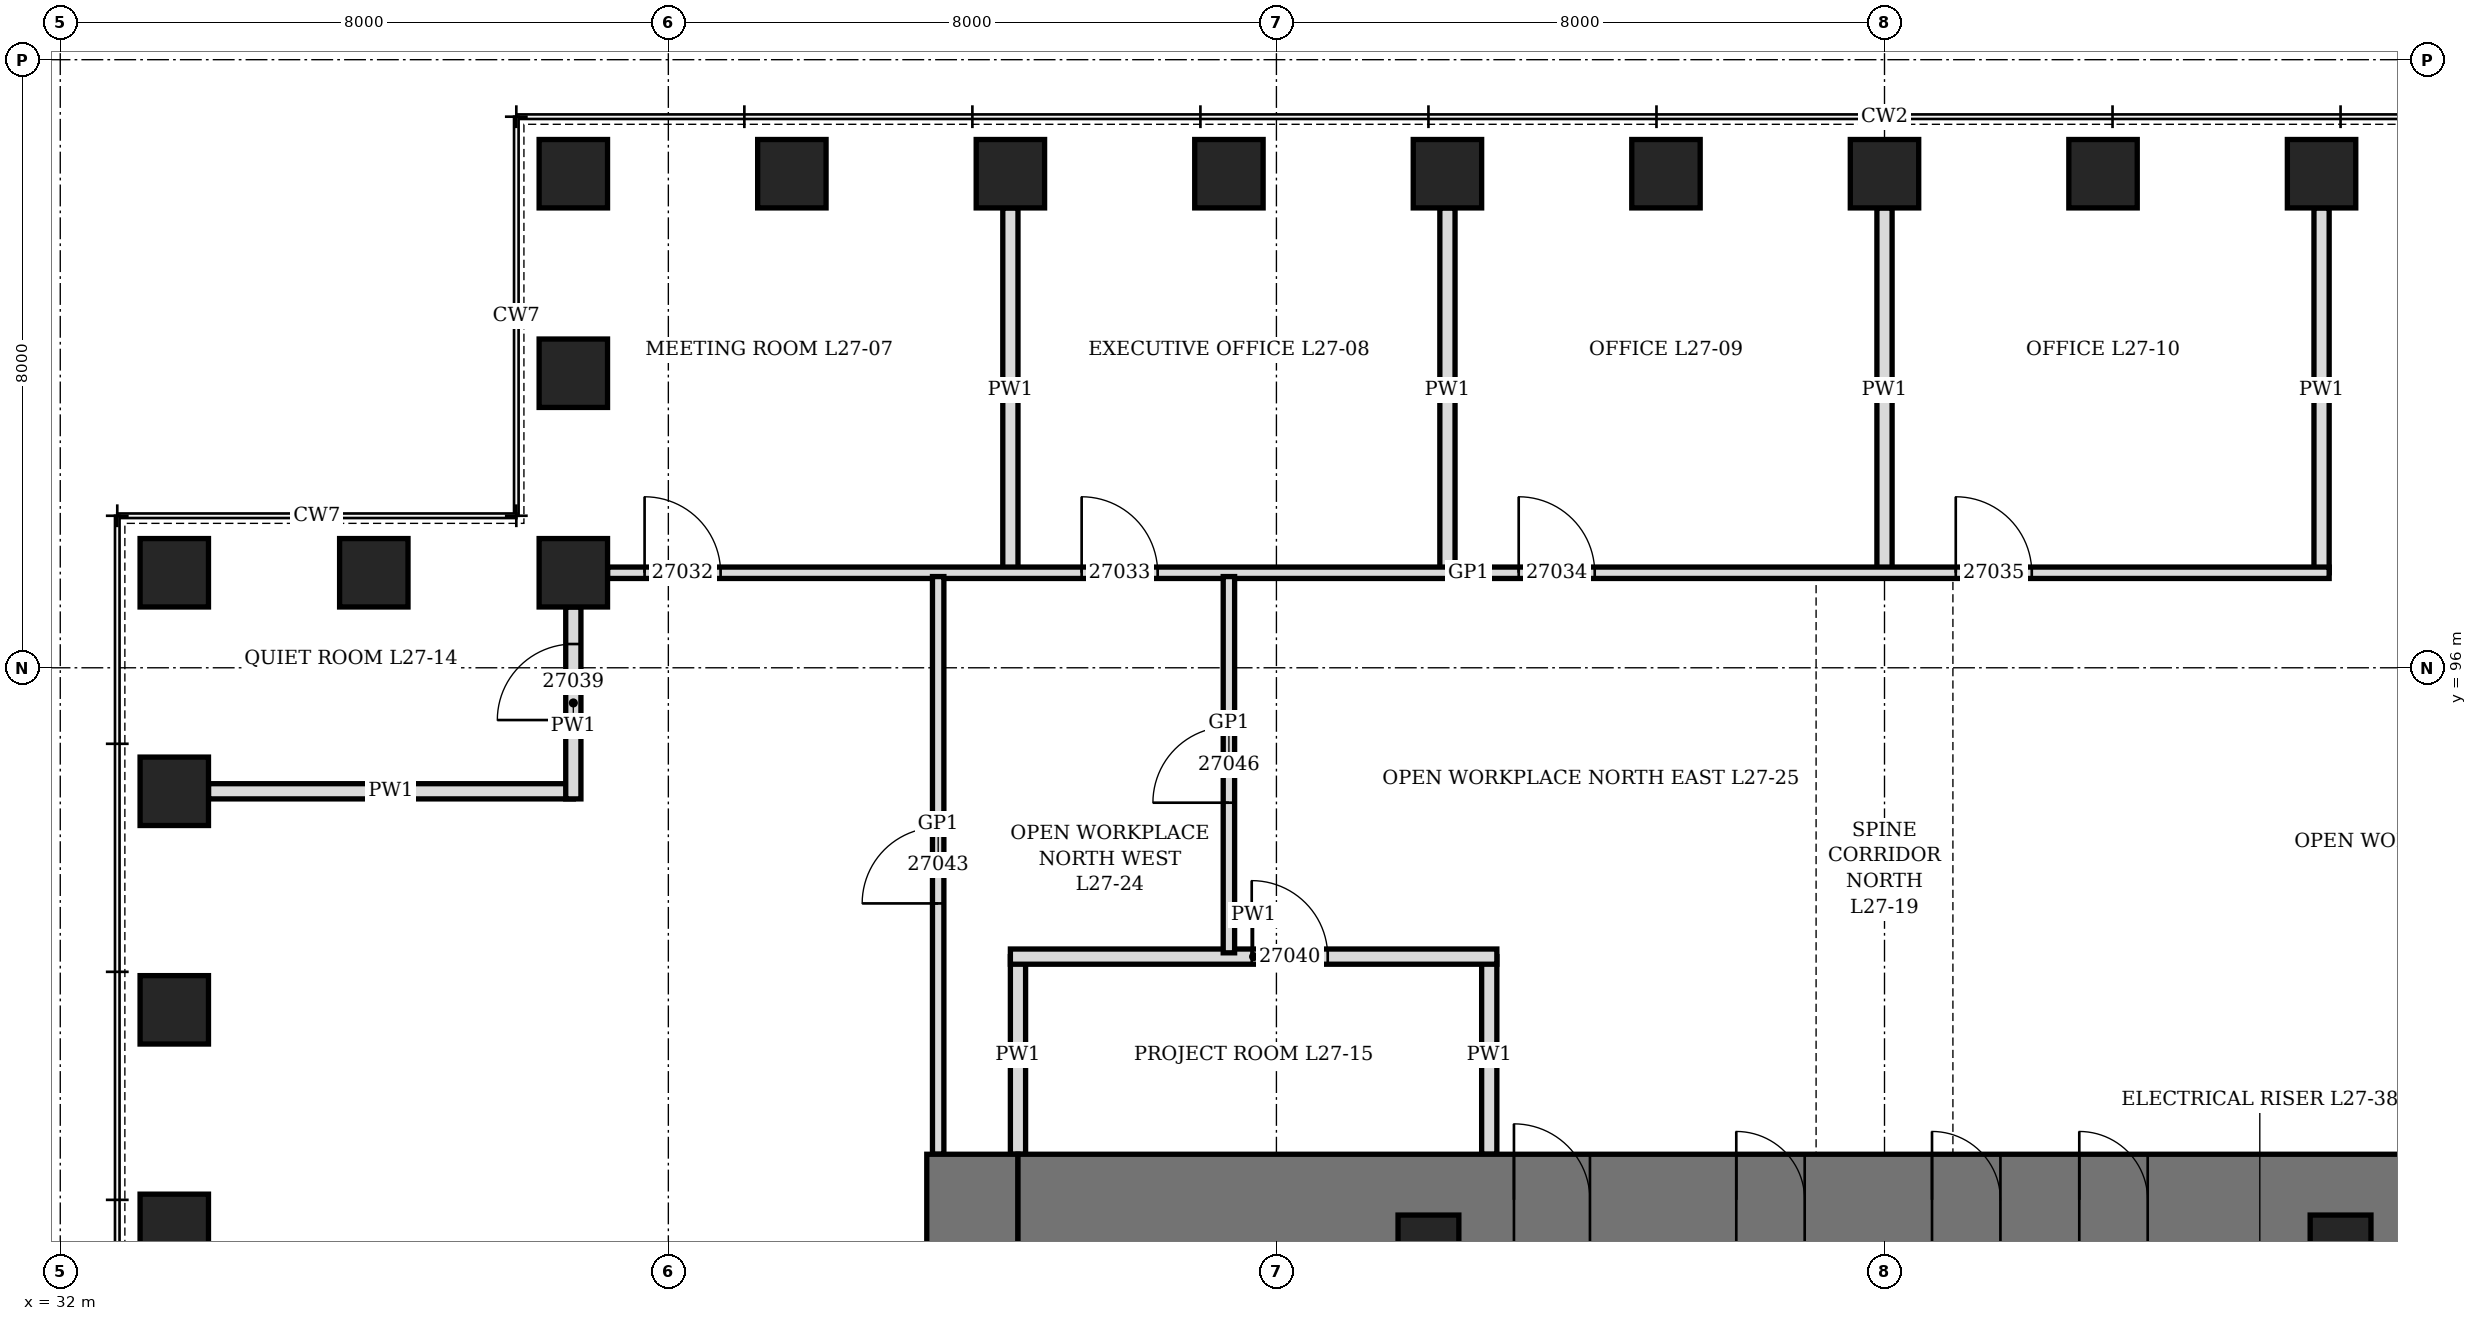
"""IFC4 building model, lengths in metres.
Left out: names, types, materials, properties, quantities, classifications, styles, units other than length and angle.
Written with IfcOpenShell. Run it as: python <this file> out.ifc"""

import sys

from ifc_helpers import new_model, si_unit, direction, frame, frame_2d, origin, origin_2d, place, context, subcontext, project, spatial, rectangle, hollow_rectangle, extrude, element, fill, save


model = new_model("IFC4")
c1 = context("Model", 3, precision=1e-05, world=origin(), true_north=direction((0.0, 1.0)))
c2 = subcontext(c1, "Body", "Model", "MODEL_VIEW")
j1 = project(units=[si_unit("LENGTHUNIT", "METRE"), si_unit("PLANEANGLEUNIT", "RADIAN")], contexts=[c1])
p1 = place(None, origin())
s1 = spatial("IfcSite", under=j1, at=p1, CompositionType="ELEMENT")
p2 = place(p1, origin())
s2 = spatial("IfcBuilding", under=s1, at=p2, CompositionType="ELEMENT")
p3 = place(p2, frame((0.0, 0.0, 124.9)))
s3 = spatial("IfcBuildingStorey", under=s2, at=p3, CompositionType="ELEMENT", Elevation=124.9)
for number, where, z_axis, x_axis in (
    (1, (61.75, 102.5, 0.0), (0.0, 0.0, 1.0), (1.0, 0.0, 0.0)),
    (2, (58.875, 102.5, 0.0), (0.0, 0.0, 1.0), (1.0, 0.0, 0.0)),
    (3, (56.0, 102.5, 0.0), (0.0, 0.0, 1.0), (1.0, 0.0, 0.0)),
    (4, (53.125, 102.5, 0.0), (0.0, 0.0, 1.0), (1.0, 0.0, 0.0)),
    (5, (50.25, 102.5, 0.0), (0.0, 0.0, 1.0), (1.0, 0.0, 0.0)),
    (6, (47.375, 102.5, 0.0), (0.0, 0.0, 1.0), (1.0, 0.0, 0.0)),
    (7, (44.5, 102.5, 0.0), (0.0, 0.0, 1.0), (1.0, 0.0, 0.0)),
    (8, (41.625, 102.5, 0.0), (0.0, 0.0, 1.0), (1.0, 0.0, 0.0)),
    (9, (38.75, 102.5, 0.0), (0.0, 0.0, 1.0), (0.0, 1.0, 0.0)),
    (10, (38.75, 99.875, 0.0), (0.0, 0.0, 1.0), (0.0, 1.0, 0.0)),
    (11, (38.75, 97.25, 0.0), (0.0, 0.0, 1.0), (1.0, 0.0, 0.0)),
    (12, (36.125, 97.25, 0.0), (0.0, 0.0, 1.0), (1.0, 0.0, 0.0)),
    (13, (33.5, 97.25, 0.0), (0.0, 0.0, 1.0), (0.0, 1.0, 0.0)),
    (14, (33.5, 94.375, 0.0), (0.0, 0.0, 1.0), (0.0, 1.0, 0.0)),
    (15, (33.5, 91.5, 0.0), (0.0, 0.0, 1.0), (0.0, 1.0, 0.0)),
    (16, (33.5, 88.625, 0.0), (0.0, 0.0, 1.0), (0.0, 1.0, 0.0)),
):
    element("IfcColumn", number, at=place(p3, frame(where, z_axis=z_axis, x_axis=x_axis)), inside=s3, PredefinedType="COLUMN", context=c2, shape_type="SweptSolid", body=[
        extrude(hollow_rectangle(XDim=0.9, YDim=0.9, WallThickness=0.15, at=origin_2d()), origin(), (0.0, 0.0, 1.0), 4.2),
    ])
p4 = place(p3, frame((44.0, 70.4, 0.0), z_axis=(0.0, 0.0, 1.0), x_axis=(0.0, 1.0, 0.0)))
e17 = element("IfcWall", 17, at=p4, inside=s3, PredefinedType="SHEAR", context=c2, shape_type="SweptSolid", body=[
    extrude(rectangle(XDim=19.2, YDim=1.2, at=frame_2d((9.6, 0.0))), origin(), (0.0, 0.0, 1.0), 4.2),
])
p5 = place(p4, frame((8.6, 0.0, 0.0)))
e18 = element("IfcOpeningElement", 18, at=p5, cuts=e17, PredefinedType="OPENING", context=c2, shape_type="SweptSolid", body=[
    extrude(rectangle(XDim=2.0, YDim=2.4, at=frame_2d((1.0, 1.2))), frame((0.0, 0.61, 0.0), z_axis=(0.0, -1.0, 0.0), x_axis=(1.0, 0.0, 0.0)), (0.0, 0.0, 1.0), 1.22),
])
p6 = place(p3, frame((44.6, 89.0, 0.0), z_axis=(0.0, 0.0, 1.0), x_axis=(1.0, 0.0, 0.0)))
e19 = element("IfcWall", 19, at=p6, inside=s3, PredefinedType="SHEAR", context=c2, shape_type="SweptSolid", body=[
    extrude(rectangle(XDim=22.8, YDim=1.2, at=frame_2d((11.4, 0.0))), origin(), (0.0, 0.0, 1.0), 4.2),
])
p7 = place(p6, frame((6.525, 0.0, 0.0)))
e20 = element("IfcOpeningElement", 20, at=p7, cuts=e19, PredefinedType="OPENING", context=c2, shape_type="SweptSolid", body=[
    extrude(rectangle(XDim=1.0, YDim=2.1, at=frame_2d((0.5, 1.05))), frame((0.0, 0.61, 0.0), z_axis=(0.0, -1.0, 0.0), x_axis=(1.0, 0.0, 0.0)), (0.0, 0.0, 1.0), 1.22),
])
p8 = place(p6, frame((9.45, 0.0, 0.0)))
e21 = element("IfcOpeningElement", 21, at=p8, cuts=e19, PredefinedType="OPENING", context=c2, shape_type="SweptSolid", body=[
    extrude(rectangle(XDim=0.9, YDim=2.1, at=frame_2d((0.45, 1.05))), frame((0.0, 0.61, 0.0), z_axis=(0.0, -1.0, 0.0), x_axis=(1.0, 0.0, 0.0)), (0.0, 0.0, 1.0), 1.22),
])
p9 = place(p6, frame((12.025, 0.0, 0.0)))
e22 = element("IfcOpeningElement", 22, at=p9, cuts=e19, PredefinedType="OPENING", context=c2, shape_type="SweptSolid", body=[
    extrude(rectangle(XDim=0.9, YDim=2.1, at=frame_2d((0.45, 1.05))), frame((0.0, 0.61, 0.0), z_axis=(0.0, -1.0, 0.0), x_axis=(1.0, 0.0, 0.0)), (0.0, 0.0, 1.0), 1.22),
])
p10 = place(p6, frame((13.962, 0.0, 0.0)))
e23 = element("IfcOpeningElement", 23, at=p10, cuts=e19, PredefinedType="OPENING", context=c2, shape_type="SweptSolid", body=[
    extrude(rectangle(XDim=0.9, YDim=2.1, at=frame_2d((0.45, 1.05))), frame((0.0, 0.61, 0.0), z_axis=(0.0, -1.0, 0.0), x_axis=(1.0, 0.0, 0.0)), (0.0, 0.0, 1.0), 1.22),
])
for number, where, z_axis, x_axis in (
    (24, (50.0, 88.4, 0.0), (0.0, 0.0, 1.0), (1.0, 0.0, 0.0)),
    (25, (62.0, 88.4, 0.0), (0.0, 0.0, 1.0), (1.0, 0.0, 0.0)),
):
    element("IfcColumn", number, at=place(p3, frame(where, z_axis=z_axis, x_axis=x_axis)), inside=s3, PredefinedType="COLUMN", context=c2, shape_type="SweptSolid", body=[
        extrude(hollow_rectangle(XDim=0.8, YDim=0.8, WallThickness=0.1, at=origin_2d()), origin(), (0.0, 0.0, 1.0), 4.2),
    ])
p11 = place(p3, frame((44.5, 97.25, 0.0), z_axis=(0.0, 0.0, 1.0), x_axis=(0.0, 1.0, 0.0)))
e26 = element("IfcWall", 26, at=p11, inside=s3, PredefinedType="PARTITIONING", context=c2, shape_type="SweptSolid", body=[
    extrude(rectangle(XDim=4.8, YDim=0.2, at=frame_2d((2.4, 0.0))), origin(), (0.0, 0.0, 1.0), 2.74),
])
for number, where, z_axis, x_axis in (
    (27, (50.25, 97.25, 0.0), (0.0, 0.0, 1.0), (0.0, 1.0, 0.0)),
    (28, (56.0, 97.25, 0.0), (0.0, 0.0, 1.0), (0.0, 1.0, 0.0)),
    (29, (61.75, 97.25, 0.0), (0.0, 0.0, 1.0), (0.0, 1.0, 0.0)),
):
    element("IfcWall", number, at=place(p3, frame(where, z_axis=z_axis, x_axis=x_axis)), inside=s3, PredefinedType="PARTITIONING", context=c2, shape_type="SweptSolid", body=[
        extrude(rectangle(XDim=4.8, YDim=0.2, at=frame_2d((2.4, 0.0))), origin(), (0.0, 0.0, 1.0), 3.278),
    ])
p12 = place(p3, frame((33.95, 94.375, 0.0), z_axis=(0.0, 0.0, 1.0), x_axis=(1.0, 0.0, 0.0)))
e30 = element("IfcWall", 30, at=p12, inside=s3, PredefinedType="PARTITIONING", context=c2, shape_type="SweptSolid", body=[
    extrude(rectangle(XDim=4.8, YDim=0.2, at=frame_2d((2.4, 0.0))), origin(), (0.0, 0.0, 1.0), 3.428),
])
p13 = place(p3, frame((44.6, 89.6, 0.0), z_axis=(0.0, 0.0, 1.0), x_axis=(0.0, 1.0, 0.0)))
e31 = element("IfcWall", 31, at=p13, inside=s3, PredefinedType="PARTITIONING", context=c2, shape_type="SweptSolid", body=[
    extrude(rectangle(XDim=2.6, YDim=0.2, at=frame_2d((1.3, 0.0))), origin(), (0.0, 0.0, 1.0), 2.74),
])
p14 = place(p3, frame((50.8, 89.6, 0.0), z_axis=(0.0, 0.0, 1.0), x_axis=(0.0, 1.0, 0.0)))
e32 = element("IfcWall", 32, at=p14, inside=s3, PredefinedType="PARTITIONING", context=c2, shape_type="SweptSolid", body=[
    extrude(rectangle(XDim=2.6, YDim=0.2, at=frame_2d((1.3, 0.0))), origin(), (0.0, 0.0, 1.0), 4.04),
])
p15 = place(p3, frame((44.5, 92.2, 0.0), z_axis=(0.0, 0.0, 1.0), x_axis=(1.0, 0.0, 0.0)))
e33 = element("IfcWall", 33, at=p15, inside=s3, PredefinedType="PARTITIONING", context=c2, shape_type="SweptSolid", body=[
    extrude(rectangle(XDim=6.4, YDim=0.2, at=frame_2d((3.2, 0.0))), origin(), (0.0, 0.0, 1.0), 4.04),
])
p16 = place(p15, frame((3.175, 0.0, 0.0)))
e34 = element("IfcOpeningElement", 34, at=p16, cuts=e33, PredefinedType="OPENING", context=c2, shape_type="SweptSolid", body=[
    extrude(rectangle(XDim=1.0, YDim=2.1, at=frame_2d((0.5, 1.05))), frame((0.0, 0.11, 0.0), z_axis=(0.0, -1.0, 0.0), x_axis=(1.0, 0.0, 0.0)), (0.0, 0.0, 1.0), 0.22),
])
p17 = place(p3, frame((39.2, 97.25, 0.0), z_axis=(0.0, 0.0, 1.0), x_axis=(1.0, 0.0, 0.0)))
e35 = element("IfcWall", 35, at=p17, inside=s3, PredefinedType="PARTITIONING", context=c2, shape_type="SweptSolid", body=[
    extrude(rectangle(XDim=22.65, YDim=0.15, at=frame_2d((11.325, 0.0))), origin(), (0.0, 0.0, 1.0), 4.04),
])
p18 = place(p17, frame((0.488, 0.0, 0.0)))
e36 = element("IfcOpeningElement", 36, at=p18, cuts=e35, PredefinedType="OPENING", context=c2, shape_type="SweptSolid", body=[
    extrude(rectangle(XDim=1.0, YDim=2.4, at=frame_2d((0.5, 1.2))), frame((0.0, 0.085, 0.0), z_axis=(0.0, -1.0, 0.0), x_axis=(1.0, 0.0, 0.0)), (0.0, 0.0, 1.0), 0.17),
])
p19 = place(p17, frame((6.238, 0.0, 0.0)))
e37 = element("IfcOpeningElement", 37, at=p19, cuts=e35, PredefinedType="OPENING", context=c2, shape_type="SweptSolid", body=[
    extrude(rectangle(XDim=1.0, YDim=2.1, at=frame_2d((0.5, 1.05))), frame((0.0, 0.085, 0.0), z_axis=(0.0, -1.0, 0.0), x_axis=(1.0, 0.0, 0.0)), (0.0, 0.0, 1.0), 0.17),
])
p20 = place(p17, frame((11.988, 0.0, 0.0)))
e38 = element("IfcOpeningElement", 38, at=p20, cuts=e35, PredefinedType="OPENING", context=c2, shape_type="SweptSolid", body=[
    extrude(rectangle(XDim=1.0, YDim=2.1, at=frame_2d((0.5, 1.05))), frame((0.0, 0.085, 0.0), z_axis=(0.0, -1.0, 0.0), x_axis=(1.0, 0.0, 0.0)), (0.0, 0.0, 1.0), 0.17),
])
p21 = place(p17, frame((17.738, 0.0, 0.0)))
e39 = element("IfcOpeningElement", 39, at=p21, cuts=e35, PredefinedType="OPENING", context=c2, shape_type="SweptSolid", body=[
    extrude(rectangle(XDim=1.0, YDim=2.1, at=frame_2d((0.5, 1.05))), frame((0.0, 0.085, 0.0), z_axis=(0.0, -1.0, 0.0), x_axis=(1.0, 0.0, 0.0)), (0.0, 0.0, 1.0), 0.17),
])
p22 = place(p3, frame((38.75, 94.275, 0.0), z_axis=(0.0, 0.0, 1.0), x_axis=(0.0, 1.0, 0.0)))
e40 = element("IfcWall", 40, at=p22, inside=s3, PredefinedType="PARTITIONING", context=c2, shape_type="SweptSolid", body=[
    extrude(rectangle(XDim=2.525, YDim=0.2, at=frame_2d((1.263, 0.0))), origin(), (0.0, 0.0, 1.0), 4.04),
])
p23 = place(p22, frame((1.038, 0.0, 0.0)))
e41 = element("IfcOpeningElement", 41, at=p23, cuts=e40, PredefinedType="OPENING", context=c2, shape_type="SweptSolid", body=[
    extrude(rectangle(XDim=1.0, YDim=2.1, at=frame_2d((0.5, 1.05))), frame((0.0, 0.11, 0.0), z_axis=(0.0, -1.0, 0.0), x_axis=(1.0, 0.0, 0.0)), (0.0, 0.0, 1.0), 0.22),
])
p24 = place(p3, frame((43.55, 89.6, 0.0), z_axis=(0.0, 0.0, 1.0), x_axis=(0.0, 1.0, 0.0)))
e42 = element("IfcWall", 42, at=p24, inside=s3, PredefinedType="PARTITIONING", context=c2, shape_type="SweptSolid", body=[
    extrude(rectangle(XDim=7.6, YDim=0.15, at=frame_2d((3.8, 0.0))), origin(), (0.0, 0.0, 1.0), 4.04),
])
p25 = place(p24, frame((3.3, 0.0, 0.0)))
e43 = element("IfcOpeningElement", 43, at=p25, cuts=e42, PredefinedType="OPENING", context=c2, shape_type="SweptSolid", body=[
    extrude(rectangle(XDim=1.0, YDim=2.4, at=frame_2d((0.5, 1.2))), frame((0.0, 0.085, 0.0), z_axis=(0.0, -1.0, 0.0), x_axis=(1.0, 0.0, 0.0)), (0.0, 0.0, 1.0), 0.17),
])
p26 = place(p3, frame((47.375, 92.25, 0.0), z_axis=(0.0, 0.0, 1.0), x_axis=(0.0, 1.0, 0.0)))
e44 = element("IfcWall", 44, at=p26, inside=s3, PredefinedType="PARTITIONING", context=c2, shape_type="SweptSolid", body=[
    extrude(rectangle(XDim=4.95, YDim=0.15, at=frame_2d((2.475, 0.0))), origin(), (0.0, 0.0, 1.0), 3.278),
])
p27 = place(p26, frame((1.975, 0.0, 0.0)))
e45 = element("IfcOpeningElement", 45, at=p27, cuts=e44, PredefinedType="OPENING", context=c2, shape_type="SweptSolid", body=[
    extrude(rectangle(XDim=1.0, YDim=2.4, at=frame_2d((0.5, 1.2))), frame((0.0, 0.085, 0.0), z_axis=(0.0, -1.0, 0.0), x_axis=(1.0, 0.0, 0.0)), (0.0, 0.0, 1.0), 0.17),
])
p28 = place(p7, origin())
e46 = element("IfcDoor", 46, at=p28, inside=s3, OperationType="SINGLE_SWING_LEFT", PredefinedType="DOOR", context=c2, shape_type="SweptSolid", body=[
    extrude(rectangle(XDim=1.0, YDim=2.1, at=frame_2d((0.5, 1.05))), frame((0.0, 0.35, 0.0), z_axis=(0.0, -1.0, 0.0), x_axis=(1.0, 0.0, 0.0)), (0.0, 0.0, 1.0), 0.7),
])
fill(e20, e46)
p29 = place(p8, origin())
e47 = element("IfcDoor", 47, at=p29, inside=s3, OperationType="SINGLE_SWING_LEFT", PredefinedType="DOOR", context=c2, shape_type="SweptSolid", body=[
    extrude(rectangle(XDim=0.9, YDim=2.1, at=frame_2d((0.45, 1.05))), frame((0.0, 0.35, 0.0), z_axis=(0.0, -1.0, 0.0), x_axis=(1.0, 0.0, 0.0)), (0.0, 0.0, 1.0), 0.7),
])
fill(e21, e47)
p30 = place(p9, origin())
e48 = element("IfcDoor", 48, at=p30, inside=s3, OperationType="SINGLE_SWING_LEFT", PredefinedType="DOOR", context=c2, shape_type="SweptSolid", body=[
    extrude(rectangle(XDim=0.9, YDim=2.1, at=frame_2d((0.45, 1.05))), frame((0.0, 0.35, 0.0), z_axis=(0.0, -1.0, 0.0), x_axis=(1.0, 0.0, 0.0)), (0.0, 0.0, 1.0), 0.7),
])
fill(e22, e48)
p31 = place(p10, origin())
e49 = element("IfcDoor", 49, at=p31, inside=s3, OperationType="SINGLE_SWING_LEFT", PredefinedType="DOOR", context=c2, shape_type="SweptSolid", body=[
    extrude(rectangle(XDim=0.9, YDim=2.1, at=frame_2d((0.45, 1.05))), frame((0.0, 0.35, 0.0), z_axis=(0.0, -1.0, 0.0), x_axis=(1.0, 0.0, 0.0)), (0.0, 0.0, 1.0), 0.7),
])
fill(e23, e49)
p32 = place(p18, origin())
e50 = element("IfcDoor", 50, at=p32, inside=s3, OperationType="SINGLE_SWING_RIGHT", PredefinedType="DOOR", context=c2, shape_type="SweptSolid", body=[
    extrude(rectangle(XDim=1.0, YDim=2.4, at=frame_2d((0.5, 1.2))), frame((0.0, 0.075, 0.0), z_axis=(0.0, -1.0, 0.0), x_axis=(1.0, 0.0, 0.0)), (0.0, 0.0, 1.0), 0.149),
])
fill(e36, e50)
p33 = place(p19, origin())
e51 = element("IfcDoor", 51, at=p33, inside=s3, OperationType="SINGLE_SWING_LEFT", PredefinedType="DOOR", context=c2, shape_type="SweptSolid", body=[
    extrude(rectangle(XDim=1.0, YDim=2.1, at=frame_2d((0.5, 1.05))), frame((0.0, 0.075, 0.0), z_axis=(0.0, -1.0, 0.0), x_axis=(1.0, 0.0, 0.0)), (0.0, 0.0, 1.0), 0.149),
])
fill(e37, e51)
p34 = place(p20, origin())
e52 = element("IfcDoor", 52, at=p34, inside=s3, OperationType="SINGLE_SWING_LEFT", PredefinedType="DOOR", context=c2, shape_type="SweptSolid", body=[
    extrude(rectangle(XDim=1.0, YDim=2.1, at=frame_2d((0.5, 1.05))), frame((0.0, 0.075, 0.0), z_axis=(0.0, -1.0, 0.0), x_axis=(1.0, 0.0, 0.0)), (0.0, 0.0, 1.0), 0.149),
])
fill(e38, e52)
p35 = place(p21, origin())
e53 = element("IfcDoor", 53, at=p35, inside=s3, OperationType="SINGLE_SWING_LEFT", PredefinedType="DOOR", context=c2, shape_type="SweptSolid", body=[
    extrude(rectangle(XDim=1.0, YDim=2.1, at=frame_2d((0.5, 1.05))), frame((0.0, 0.075, 0.0), z_axis=(0.0, -1.0, 0.0), x_axis=(1.0, 0.0, 0.0)), (0.0, 0.0, 1.0), 0.149),
])
fill(e39, e53)
p36 = place(p23, origin())
e54 = element("IfcDoor", 54, at=p36, inside=s3, OperationType="SINGLE_SWING_LEFT", PredefinedType="DOOR", context=c2, shape_type="SweptSolid", body=[
    extrude(rectangle(XDim=1.0, YDim=2.1, at=frame_2d((0.5, 1.05))), frame((0.0, 0.1, 0.0), z_axis=(0.0, -1.0, 0.0), x_axis=(1.0, 0.0, 0.0)), (0.0, 0.0, 1.0), 0.199),
])
fill(e41, e54)
p37 = place(p16, origin())
e55 = element("IfcDoor", 55, at=p37, inside=s3, OperationType="SINGLE_SWING_LEFT", PredefinedType="DOOR", context=c2, shape_type="SweptSolid", body=[
    extrude(rectangle(XDim=1.0, YDim=2.1, at=frame_2d((0.5, 1.05))), frame((0.0, 0.1, 0.0), z_axis=(0.0, -1.0, 0.0), x_axis=(1.0, 0.0, 0.0)), (0.0, 0.0, 1.0), 0.199),
])
fill(e34, e55)
p38 = place(p25, origin())
e56 = element("IfcDoor", 56, at=p38, inside=s3, OperationType="SINGLE_SWING_RIGHT", PredefinedType="DOOR", context=c2, shape_type="SweptSolid", body=[
    extrude(rectangle(XDim=1.0, YDim=2.4, at=frame_2d((0.5, 1.2))), frame((0.0, 0.075, 0.0), z_axis=(0.0, -1.0, 0.0), x_axis=(1.0, 0.0, 0.0)), (0.0, 0.0, 1.0), 0.149),
])
fill(e43, e56)
p39 = place(p27, origin())
e57 = element("IfcDoor", 57, at=p39, inside=s3, OperationType="SINGLE_SWING_RIGHT", PredefinedType="DOOR", context=c2, shape_type="SweptSolid", body=[
    extrude(rectangle(XDim=1.0, YDim=2.4, at=frame_2d((0.5, 1.2))), frame((0.0, 0.075, 0.0), z_axis=(0.0, -1.0, 0.0), x_axis=(1.0, 0.0, 0.0)), (0.0, 0.0, 1.0), 0.149),
])
fill(e45, e57)
save(model, sys.argv[1])
